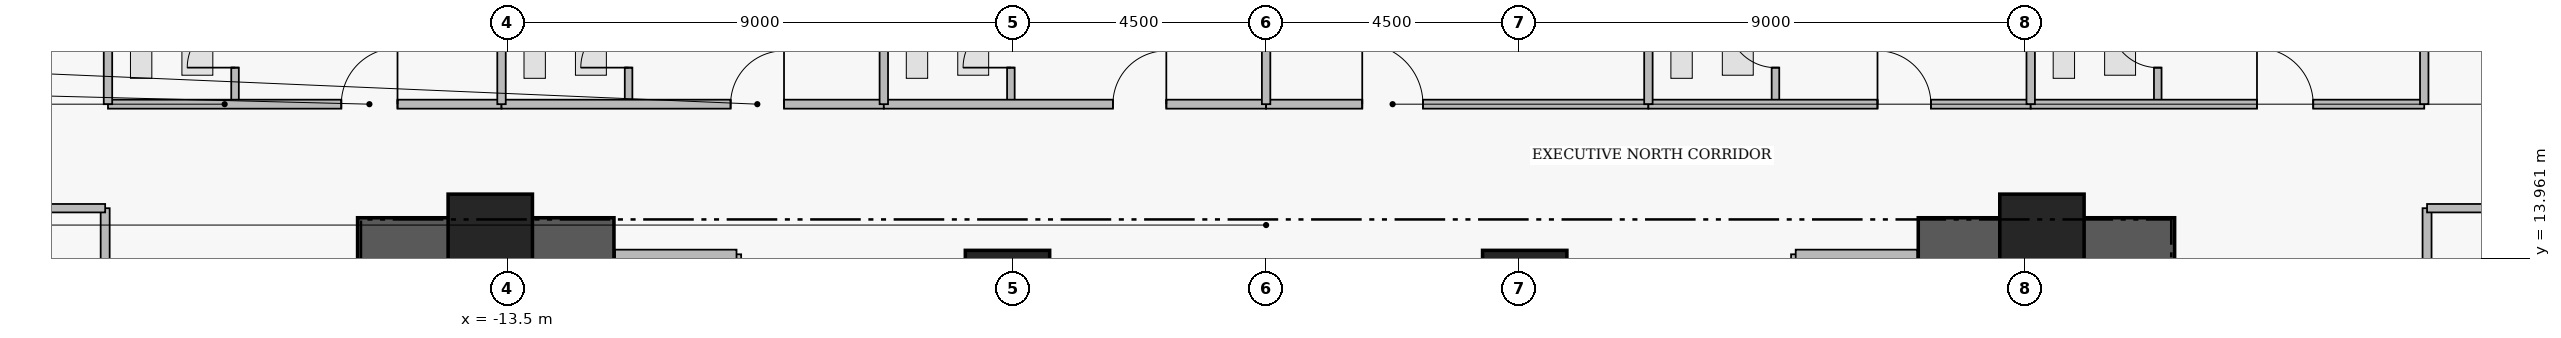
"""IFC4 building model, lengths in metres.
Left out: names, types, materials, properties, quantities, classifications, styles, units other than length and angle.
Written with IfcOpenShell. Run it as: python <this file> out.ifc"""

import sys

from ifc_helpers import new_model, si_unit, direction, frame, frame_2d, origin, origin_2d, place, context, subcontext, project, spatial, rectangle, extrude, element, fill, save


model = new_model("IFC4")
c1 = context("Model", 3, precision=1e-05, world=origin(), true_north=direction((0.0, 1.0)))
c2 = subcontext(c1, "Body", "Model", "MODEL_VIEW")
j1 = project(units=[si_unit("LENGTHUNIT", "METRE"), si_unit("PLANEANGLEUNIT", "RADIAN")], contexts=[c1])
p1 = place(None, origin())
s1 = spatial("IfcSite", under=j1, at=p1, CompositionType="ELEMENT")
p2 = place(p1, origin())
s2 = spatial("IfcBuilding", under=s1, at=p2, CompositionType="ELEMENT")
p3 = place(p2, frame((0.0, 0.0, 128.5)))
s3 = spatial("IfcBuildingStorey", under=s2, at=p3, CompositionType="ELEMENT", Elevation=128.5)
for number, where, z_axis, x_axis in (
    (1, (-16.16, 14.305, 0.0), (0.0, 0.0, 1.0), (1.0, 0.0, 0.0)),
    (2, (11.6, 14.305, 0.0), (0.0, 0.0, 1.0), (1.0, 0.0, 0.0)),
):
    element("IfcWall", number, at=place(p3, frame(where, z_axis=z_axis, x_axis=x_axis)), inside=s3, PredefinedType="SHEAR", context=c2, shape_type="SweptSolid", body=[
        extrude(rectangle(XDim=4.56, YDim=0.75, at=frame_2d((2.28, 0.0))), origin(), (0.0, 0.0, 1.0), 3.46),
    ])
for number, where, z_axis, x_axis in (
    (3, (-13.8, 14.35, 0.0), (0.0, 0.0, 1.0), (1.0, 0.0, 0.0)),
    (4, (-4.6, 13.35, 0.0), (0.0, 0.0, 1.0), (1.0, 0.0, 0.0)),
    (5, (4.6, 13.35, 0.0), (0.0, 0.0, 1.0), (1.0, 0.0, 0.0)),
    (6, (13.8, 14.35, 0.0), (0.0, 0.0, 1.0), (1.0, 0.0, 0.0)),
):
    element("IfcColumn", number, at=place(p3, frame(where, z_axis=z_axis, x_axis=x_axis)), inside=s3, PredefinedType="COLUMN", context=c2, shape_type="SweptSolid", body=[
        extrude(rectangle(XDim=1.5, YDim=1.5, at=origin_2d()), origin(), (0.0, 0.0, 1.0), 3.65),
    ])
p4 = place(p3, frame((-18.34, 16.7, 0.0), z_axis=(0.0, 0.0, 1.0), x_axis=(0.0, 1.0, 0.0)))
e7 = element("IfcWall", 7, at=p4, inside=s3, PredefinedType="PLUMBINGWALL", context=c2, shape_type="SweptSolid", body=[
    extrude(rectangle(XDim=2.36, YDim=0.135, at=frame_2d((1.18, 0.0))), origin(), (0.0, 0.0, 1.0), 3.43),
])
p5 = place(p4, frame((0.65, 0.0, 0.0)))
e8 = element("IfcOpeningElement", 8, at=p5, cuts=e7, PredefinedType="OPENING", context=c2, shape_type="SweptSolid", body=[
    extrude(rectangle(XDim=0.85, YDim=2.1, at=frame_2d((0.425, 1.05))), frame((0.0, 0.077, 0.0), z_axis=(0.0, -1.0, 0.0), x_axis=(1.0, 0.0, 0.0)), (0.0, 0.0, 1.0), 0.155),
])
p6 = place(p3, frame((-20.6, 16.7, 0.0), z_axis=(0.0, 0.0, 1.0), x_axis=(1.0, 0.0, 0.0)))
e9 = element("IfcWall", 9, at=p6, inside=s3, PredefinedType="PARTITIONING", context=c2, shape_type="SweptSolid", body=[
    extrude(rectangle(XDim=7.0, YDim=0.16, at=frame_2d((3.5, 0.0))), origin(), (0.0, 0.0, 1.0), 3.43),
])
p7 = place(p6, frame((4.15, 0.0, 0.0)))
e10 = element("IfcOpeningElement", 10, at=p7, cuts=e9, PredefinedType="OPENING", context=c2, shape_type="SweptSolid", body=[
    extrude(rectangle(XDim=1.0, YDim=2.15, at=frame_2d((0.5, 1.075))), frame((0.0, 0.09, 0.0), z_axis=(0.0, -1.0, 0.0), x_axis=(1.0, 0.0, 0.0)), (0.0, 0.0, 1.0), 0.18),
])
p8 = place(p3, frame((-11.34, 16.7, 0.0), z_axis=(0.0, 0.0, 1.0), x_axis=(0.0, 1.0, 0.0)))
e11 = element("IfcWall", 11, at=p8, inside=s3, PredefinedType="PLUMBINGWALL", context=c2, shape_type="SweptSolid", body=[
    extrude(rectangle(XDim=2.36, YDim=0.135, at=frame_2d((1.18, 0.0))), origin(), (0.0, 0.0, 1.0), 3.43),
])
p9 = place(p8, frame((0.65, 0.0, 0.0)))
e12 = element("IfcOpeningElement", 12, at=p9, cuts=e11, PredefinedType="OPENING", context=c2, shape_type="SweptSolid", body=[
    extrude(rectangle(XDim=0.85, YDim=2.1, at=frame_2d((0.425, 1.05))), frame((0.0, 0.077, 0.0), z_axis=(0.0, -1.0, 0.0), x_axis=(1.0, 0.0, 0.0)), (0.0, 0.0, 1.0), 0.155),
])
p10 = place(p3, frame((-13.6, 16.7, 0.0), z_axis=(0.0, 0.0, 1.0), x_axis=(1.0, 0.0, 0.0)))
e13 = element("IfcWall", 13, at=p10, inside=s3, PredefinedType="PARTITIONING", context=c2, shape_type="SweptSolid", body=[
    extrude(rectangle(XDim=6.8, YDim=0.16, at=frame_2d((3.4, 0.0))), origin(), (0.0, 0.0, 1.0), 2.973),
])
p11 = place(p10, frame((4.075, 0.0, 0.0)))
e14 = element("IfcOpeningElement", 14, at=p11, cuts=e13, PredefinedType="OPENING", context=c2, shape_type="SweptSolid", body=[
    extrude(rectangle(XDim=0.95, YDim=2.15, at=frame_2d((0.475, 1.075))), frame((0.0, 0.09, 0.0), z_axis=(0.0, -1.0, 0.0), x_axis=(1.0, 0.0, 0.0)), (0.0, 0.0, 1.0), 0.18),
])
p12 = place(p3, frame((-4.54, 16.7, 0.0), z_axis=(0.0, 0.0, 1.0), x_axis=(0.0, 1.0, 0.0)))
e15 = element("IfcWall", 15, at=p12, inside=s3, PredefinedType="PLUMBINGWALL", context=c2, shape_type="SweptSolid", body=[
    extrude(rectangle(XDim=2.36, YDim=0.135, at=frame_2d((1.18, 0.0))), origin(), (0.0, 0.0, 1.0), 2.503),
])
p13 = place(p12, frame((0.65, 0.0, 0.0)))
e16 = element("IfcOpeningElement", 16, at=p13, cuts=e15, PredefinedType="OPENING", context=c2, shape_type="SweptSolid", body=[
    extrude(rectangle(XDim=0.85, YDim=2.1, at=frame_2d((0.425, 1.05))), frame((0.0, 0.077, 0.0), z_axis=(0.0, -1.0, 0.0), x_axis=(1.0, 0.0, 0.0)), (0.0, 0.0, 1.0), 0.155),
])
p14 = place(p3, frame((-6.8, 16.7, 0.0), z_axis=(0.0, 0.0, 1.0), x_axis=(1.0, 0.0, 0.0)))
e17 = element("IfcWall", 17, at=p14, inside=s3, PredefinedType="PARTITIONING", context=c2, shape_type="SweptSolid", body=[
    extrude(rectangle(XDim=6.8, YDim=0.16, at=frame_2d((3.4, 0.0))), origin(), (0.0, 0.0, 1.0), 2.973),
])
p15 = place(p14, frame((4.075, 0.0, 0.0)))
e18 = element("IfcOpeningElement", 18, at=p15, cuts=e17, PredefinedType="OPENING", context=c2, shape_type="SweptSolid", body=[
    extrude(rectangle(XDim=0.95, YDim=2.15, at=frame_2d((0.475, 1.075))), frame((0.0, 0.09, 0.0), z_axis=(0.0, -1.0, 0.0), x_axis=(1.0, 0.0, 0.0)), (0.0, 0.0, 1.0), 0.18),
])
p16 = place(p3, frame((0.0, 16.7, 0.0), z_axis=(0.0, 0.0, 1.0), x_axis=(1.0, 0.0, 0.0)))
e19 = element("IfcWall", 19, at=p16, inside=s3, PredefinedType="PARTITIONING", context=c2, shape_type="SweptSolid", body=[
    extrude(rectangle(XDim=6.8, YDim=0.16, at=frame_2d((3.4, 0.0))), origin(), (0.0, 0.0, 1.0), 2.973),
])
p17 = place(p16, frame((1.71, 0.0, 0.0)))
e20 = element("IfcOpeningElement", 20, at=p17, cuts=e19, PredefinedType="OPENING", context=c2, shape_type="SweptSolid", body=[
    extrude(rectangle(XDim=1.08, YDim=2.18, at=frame_2d((0.54, 1.09))), frame((0.0, 0.09, 0.0), z_axis=(0.0, -1.0, 0.0), x_axis=(1.0, 0.0, 0.0)), (0.0, 0.0, 1.0), 0.18),
])
p18 = place(p3, frame((9.06, 16.7, 0.0), z_axis=(0.0, 0.0, 1.0), x_axis=(0.0, 1.0, 0.0)))
e21 = element("IfcWall", 21, at=p18, inside=s3, PredefinedType="PLUMBINGWALL", context=c2, shape_type="SweptSolid", body=[
    extrude(rectangle(XDim=2.36, YDim=0.135, at=frame_2d((1.18, 0.0))), origin(), (0.0, 0.0, 1.0), 3.43),
])
p19 = place(p18, frame((0.65, 0.0, 0.0)))
e22 = element("IfcOpeningElement", 22, at=p19, cuts=e21, PredefinedType="OPENING", context=c2, shape_type="SweptSolid", body=[
    extrude(rectangle(XDim=0.85, YDim=2.1, at=frame_2d((0.425, 1.05))), frame((0.0, 0.077, 0.0), z_axis=(0.0, -1.0, 0.0), x_axis=(1.0, 0.0, 0.0)), (0.0, 0.0, 1.0), 0.155),
])
p20 = place(p3, frame((6.8, 16.7, 0.0), z_axis=(0.0, 0.0, 1.0), x_axis=(1.0, 0.0, 0.0)))
e23 = element("IfcWall", 23, at=p20, inside=s3, PredefinedType="PARTITIONING", context=c2, shape_type="SweptSolid", body=[
    extrude(rectangle(XDim=6.8, YDim=0.16, at=frame_2d((3.4, 0.0))), origin(), (0.0, 0.0, 1.0), 2.973),
])
p21 = place(p20, frame((4.075, 0.0, 0.0)))
e24 = element("IfcOpeningElement", 24, at=p21, cuts=e23, PredefinedType="OPENING", context=c2, shape_type="SweptSolid", body=[
    extrude(rectangle(XDim=0.95, YDim=2.15, at=frame_2d((0.475, 1.075))), frame((0.0, 0.09, 0.0), z_axis=(0.0, -1.0, 0.0), x_axis=(1.0, 0.0, 0.0)), (0.0, 0.0, 1.0), 0.18),
])
p22 = place(p3, frame((15.86, 16.7, 0.0), z_axis=(0.0, 0.0, 1.0), x_axis=(0.0, 1.0, 0.0)))
e25 = element("IfcWall", 25, at=p22, inside=s3, PredefinedType="PLUMBINGWALL", context=c2, shape_type="SweptSolid", body=[
    extrude(rectangle(XDim=2.36, YDim=0.135, at=frame_2d((1.18, 0.0))), origin(), (0.0, 0.0, 1.0), 3.43),
])
p23 = place(p22, frame((0.65, 0.0, 0.0)))
e26 = element("IfcOpeningElement", 26, at=p23, cuts=e25, PredefinedType="OPENING", context=c2, shape_type="SweptSolid", body=[
    extrude(rectangle(XDim=0.85, YDim=2.1, at=frame_2d((0.425, 1.05))), frame((0.0, 0.077, 0.0), z_axis=(0.0, -1.0, 0.0), x_axis=(1.0, 0.0, 0.0)), (0.0, 0.0, 1.0), 0.155),
])
p24 = place(p3, frame((13.6, 16.7, 0.0), z_axis=(0.0, 0.0, 1.0), x_axis=(1.0, 0.0, 0.0)))
e27 = element("IfcWall", 27, at=p24, inside=s3, PredefinedType="PARTITIONING", context=c2, shape_type="SweptSolid", body=[
    extrude(rectangle(XDim=7.0, YDim=0.16, at=frame_2d((3.5, 0.0))), origin(), (0.0, 0.0, 1.0), 3.43),
])
p25 = place(p24, frame((4.025, 0.0, 0.0)))
e28 = element("IfcOpeningElement", 28, at=p25, cuts=e27, PredefinedType="OPENING", context=c2, shape_type="SweptSolid", body=[
    extrude(rectangle(XDim=1.0, YDim=2.15, at=frame_2d((0.5, 1.075))), frame((0.0, 0.09, 0.0), z_axis=(0.0, -1.0, 0.0), x_axis=(1.0, 0.0, 0.0)), (0.0, 0.0, 1.0), 0.18),
])
p26 = place(p3, frame((20.65, 7.96, 0.0), z_axis=(0.0, 0.0, 1.0), x_axis=(0.0, 1.0, 0.0)))
e29 = element("IfcWall", 29, at=p26, inside=s3, PredefinedType="PARTITIONING", context=c2, shape_type="SweptSolid", body=[
    extrude(rectangle(XDim=6.89, YDim=0.16, at=frame_2d((3.445, 0.0))), origin(), (0.0, 0.0, 1.0), 3.43),
])
p27 = place(p26, frame((2.985, 0.0, 0.0)))
e30 = element("IfcOpeningElement", 30, at=p27, cuts=e29, PredefinedType="OPENING", context=c2, shape_type="SweptSolid", body=[
    extrude(rectangle(XDim=0.92, YDim=2.12, at=frame_2d((0.46, 1.06))), frame((0.0, 0.09, 0.0), z_axis=(0.0, -1.0, 0.0), x_axis=(1.0, 0.0, 0.0)), (0.0, 0.0, 1.0), 0.18),
])
p28 = place(p3, frame((-20.65, 1.55, 0.0), z_axis=(0.0, 0.0, 1.0), x_axis=(0.0, 1.0, 0.0)))
e31 = element("IfcWall", 31, at=p28, inside=s3, PredefinedType="PARTITIONING", context=c2, shape_type="SweptSolid", body=[
    extrude(rectangle(XDim=13.3, YDim=0.16, at=frame_2d((6.65, 0.0))), origin(), (0.0, 0.0, 1.0), 3.43),
])
p29 = place(p28, frame((6.175, 0.0, 0.0)))
e32 = element("IfcOpeningElement", 32, at=p29, cuts=e31, PredefinedType="OPENING", context=c2, shape_type="SweptSolid", body=[
    extrude(rectangle(XDim=0.95, YDim=2.15, at=frame_2d((0.475, 1.075))), frame((0.0, 0.09, 0.0), z_axis=(0.0, -1.0, 0.0), x_axis=(1.0, 0.0, 0.0)), (0.0, 0.0, 1.0), 0.18),
])
p30 = place(p3, frame((-9.42, 11.07, 0.0), z_axis=(0.0, 0.0, 1.0), x_axis=(0.0, 1.0, 0.0)))
e33 = element("IfcWall", 33, at=p30, inside=s3, PredefinedType="PARTITIONING", context=c2, shape_type="SweptSolid", body=[
    extrude(rectangle(XDim=2.96, YDim=0.165, at=frame_2d((1.48, 0.0))), origin(), (0.0, 0.0, 1.0), 3.43),
])
p31 = place(p3, frame((-11.58, 14.03, 0.0), z_axis=(0.0, 0.0, 1.0), x_axis=(1.0, 0.0, 0.0)))
e34 = element("IfcWall", 34, at=p31, inside=s3, PredefinedType="PARTITIONING", context=c2, shape_type="SweptSolid", body=[
    extrude(rectangle(XDim=2.16, YDim=0.165, at=frame_2d((1.08, 0.0))), origin(), (0.0, 0.0, 1.0), 3.43),
])
p32 = place(p3, frame((9.42, 11.07, 0.0), z_axis=(0.0, 0.0, 1.0), x_axis=(0.0, 1.0, 0.0)))
e35 = element("IfcWall", 35, at=p32, inside=s3, PredefinedType="PARTITIONING", context=c2, shape_type="SweptSolid", body=[
    extrude(rectangle(XDim=2.96, YDim=0.165, at=frame_2d((1.48, 0.0))), origin(), (0.0, 0.0, 1.0), 3.43),
])
p33 = place(p3, frame((9.42, 14.03, 0.0), z_axis=(0.0, 0.0, 1.0), x_axis=(1.0, 0.0, 0.0)))
e36 = element("IfcWall", 36, at=p33, inside=s3, PredefinedType="PARTITIONING", context=c2, shape_type="SweptSolid", body=[
    extrude(rectangle(XDim=2.16, YDim=0.165, at=frame_2d((1.08, 0.0))), origin(), (0.0, 0.0, 1.0), 3.43),
])
p34 = place(p3, frame((-20.6, 16.7, 0.0), z_axis=(0.0, 0.0, 1.0), x_axis=(0.0, 1.0, 0.0)))
e37 = element("IfcWall", 37, at=p34, inside=s3, PredefinedType="PARTITIONING", context=c2, shape_type="SweptSolid", body=[
    extrude(rectangle(XDim=8.2, YDim=0.15, at=frame_2d((4.1, 0.0))), origin(), (0.0, 0.0, 1.0), 3.43),
])
p35 = place(p3, frame((-13.6, 16.7, 0.0), z_axis=(0.0, 0.0, 1.0), x_axis=(0.0, 1.0, 0.0)))
e38 = element("IfcWall", 38, at=p35, inside=s3, PredefinedType="PARTITIONING", context=c2, shape_type="SweptSolid", body=[
    extrude(rectangle(XDim=11.62, YDim=0.15, at=frame_2d((5.81, 0.0))), origin(), (0.0, 0.0, 1.0), 2.503),
])
for number, where, z_axis, x_axis in (
    (39, (-6.8, 16.7, 0.0), (0.0, 0.0, 1.0), (0.0, 1.0, 0.0)),
    (40, (0.0, 16.7, 0.0), (0.0, 0.0, 1.0), (0.0, 1.0, 0.0)),
):
    element("IfcWall", number, at=place(p3, frame(where, z_axis=z_axis, x_axis=x_axis)), inside=s3, PredefinedType="PARTITIONING", context=c2, shape_type="SweptSolid", body=[
        extrude(rectangle(XDim=11.62, YDim=0.15, at=frame_2d((5.81, 0.0))), origin(), (0.0, 0.0, 1.0), 3.43),
    ])
p36 = place(p3, frame((6.8, 16.7, 0.0), z_axis=(0.0, 0.0, 1.0), x_axis=(0.0, 1.0, 0.0)))
e41 = element("IfcWall", 41, at=p36, inside=s3, PredefinedType="PARTITIONING", context=c2, shape_type="SweptSolid", body=[
    extrude(rectangle(XDim=11.64, YDim=0.15, at=frame_2d((5.82, 0.0))), origin(), (0.0, 0.0, 1.0), 3.43),
])
p37 = place(p3, frame((13.6, 16.7, 0.0), z_axis=(0.0, 0.0, 1.0), x_axis=(0.0, 1.0, 0.0)))
e42 = element("IfcWall", 42, at=p37, inside=s3, PredefinedType="PARTITIONING", context=c2, shape_type="SweptSolid", body=[
    extrude(rectangle(XDim=11.62, YDim=0.15, at=frame_2d((5.81, 0.0))), origin(), (0.0, 0.0, 1.0), 2.503),
])
p38 = place(p3, frame((20.6, 16.7, 0.0), z_axis=(0.0, 0.0, 1.0), x_axis=(0.0, 1.0, 0.0)))
e43 = element("IfcWall", 43, at=p38, inside=s3, PredefinedType="PARTITIONING", context=c2, shape_type="SweptSolid", body=[
    extrude(rectangle(XDim=8.2, YDim=0.15, at=frame_2d((4.1, 0.0))), origin(), (0.0, 0.0, 1.0), 3.43),
])
for number, where, z_axis, x_axis in (
    (44, (20.65, 14.85, 0.0), (0.0, 0.0, 1.0), (1.0, 0.0, 0.0)),
    (45, (-23.84, 14.85, 0.0), (0.0, 0.0, 1.0), (1.0, 0.0, 0.0)),
):
    element("IfcWall", number, at=place(p3, frame(where, z_axis=z_axis, x_axis=x_axis)), inside=s3, PredefinedType="PARTITIONING", context=c2, shape_type="SweptSolid", body=[
        extrude(rectangle(XDim=3.19, YDim=0.15, at=frame_2d((1.595, 0.0))), origin(), (0.0, 0.0, 1.0), 3.43),
    ])
p39 = place(p5, origin())
e46 = element("IfcDoor", 46, at=p39, inside=s3, OperationType="SINGLE_SWING_LEFT", PredefinedType="DOOR", context=c2, shape_type="SweptSolid", body=[
    extrude(rectangle(XDim=0.85, YDim=2.1, at=frame_2d((0.425, 1.05))), frame((0.0, 0.025, 0.0), z_axis=(0.0, -1.0, 0.0), x_axis=(1.0, 0.0, 0.0)), (0.0, 0.0, 1.0), 0.05),
])
fill(e8, e46)
p40 = place(p7, origin())
e47 = element("IfcDoor", 47, at=p40, inside=s3, OperationType="SINGLE_SWING_RIGHT", PredefinedType="DOOR", context=c2, shape_type="SweptSolid", body=[
    extrude(rectangle(XDim=1.0, YDim=2.15, at=frame_2d((0.5, 1.075))), frame((0.0, 0.025, 0.0), z_axis=(0.0, -1.0, 0.0), x_axis=(1.0, 0.0, 0.0)), (0.0, 0.0, 1.0), 0.05),
])
fill(e10, e47)
p41 = place(p9, origin())
e48 = element("IfcDoor", 48, at=p41, inside=s3, OperationType="SINGLE_SWING_LEFT", PredefinedType="DOOR", context=c2, shape_type="SweptSolid", body=[
    extrude(rectangle(XDim=0.85, YDim=2.1, at=frame_2d((0.425, 1.05))), frame((0.0, 0.025, 0.0), z_axis=(0.0, -1.0, 0.0), x_axis=(1.0, 0.0, 0.0)), (0.0, 0.0, 1.0), 0.05),
])
fill(e12, e48)
p42 = place(p11, origin())
e49 = element("IfcDoor", 49, at=p42, inside=s3, OperationType="SINGLE_SWING_RIGHT", PredefinedType="DOOR", context=c2, shape_type="SweptSolid", body=[
    extrude(rectangle(XDim=0.95, YDim=2.15, at=frame_2d((0.475, 1.075))), frame((0.0, 0.025, 0.0), z_axis=(0.0, -1.0, 0.0), x_axis=(1.0, 0.0, 0.0)), (0.0, 0.0, 1.0), 0.05),
])
fill(e14, e49)
p43 = place(p13, origin())
e50 = element("IfcDoor", 50, at=p43, inside=s3, OperationType="SINGLE_SWING_LEFT", PredefinedType="DOOR", context=c2, shape_type="SweptSolid", body=[
    extrude(rectangle(XDim=0.85, YDim=2.1, at=frame_2d((0.425, 1.05))), frame((0.0, 0.025, 0.0), z_axis=(0.0, -1.0, 0.0), x_axis=(1.0, 0.0, 0.0)), (0.0, 0.0, 1.0), 0.05),
])
fill(e16, e50)
p44 = place(p15, origin())
e51 = element("IfcDoor", 51, at=p44, inside=s3, OperationType="SINGLE_SWING_RIGHT", PredefinedType="DOOR", context=c2, shape_type="SweptSolid", body=[
    extrude(rectangle(XDim=0.95, YDim=2.15, at=frame_2d((0.475, 1.075))), frame((0.0, 0.025, 0.0), z_axis=(0.0, -1.0, 0.0), x_axis=(1.0, 0.0, 0.0)), (0.0, 0.0, 1.0), 0.05),
])
fill(e18, e51)
p45 = place(p17, origin())
e52 = element("IfcDoor", 52, at=p45, inside=s3, OperationType="SINGLE_SWING_LEFT", PredefinedType="DOOR", context=c2, shape_type="SweptSolid", body=[
    extrude(rectangle(XDim=1.08, YDim=2.18, at=frame_2d((0.54, 1.09))), frame((0.0, 0.025, 0.0), z_axis=(0.0, -1.0, 0.0), x_axis=(1.0, 0.0, 0.0)), (0.0, 0.0, 1.0), 0.05),
])
fill(e20, e52)
p46 = place(p19, origin())
e53 = element("IfcDoor", 53, at=p46, inside=s3, OperationType="SINGLE_SWING_RIGHT", PredefinedType="DOOR", context=c2, shape_type="SweptSolid", body=[
    extrude(rectangle(XDim=0.85, YDim=2.1, at=frame_2d((0.425, 1.05))), frame((0.0, 0.025, 0.0), z_axis=(0.0, -1.0, 0.0), x_axis=(1.0, 0.0, 0.0)), (0.0, 0.0, 1.0), 0.05),
])
fill(e22, e53)
p47 = place(p21, origin())
e54 = element("IfcDoor", 54, at=p47, inside=s3, OperationType="SINGLE_SWING_LEFT", PredefinedType="DOOR", context=c2, shape_type="SweptSolid", body=[
    extrude(rectangle(XDim=0.95, YDim=2.15, at=frame_2d((0.475, 1.075))), frame((0.0, 0.025, 0.0), z_axis=(0.0, -1.0, 0.0), x_axis=(1.0, 0.0, 0.0)), (0.0, 0.0, 1.0), 0.05),
])
fill(e24, e54)
p48 = place(p23, origin())
e55 = element("IfcDoor", 55, at=p48, inside=s3, OperationType="SINGLE_SWING_RIGHT", PredefinedType="DOOR", context=c2, shape_type="SweptSolid", body=[
    extrude(rectangle(XDim=0.85, YDim=2.1, at=frame_2d((0.425, 1.05))), frame((0.0, 0.025, 0.0), z_axis=(0.0, -1.0, 0.0), x_axis=(1.0, 0.0, 0.0)), (0.0, 0.0, 1.0), 0.05),
])
fill(e26, e55)
p49 = place(p25, origin())
e56 = element("IfcDoor", 56, at=p49, inside=s3, OperationType="SINGLE_SWING_LEFT", PredefinedType="DOOR", context=c2, shape_type="SweptSolid", body=[
    extrude(rectangle(XDim=1.0, YDim=2.15, at=frame_2d((0.5, 1.075))), frame((0.0, 0.025, 0.0), z_axis=(0.0, -1.0, 0.0), x_axis=(1.0, 0.0, 0.0)), (0.0, 0.0, 1.0), 0.05),
])
fill(e28, e56)
save(model, sys.argv[1])
